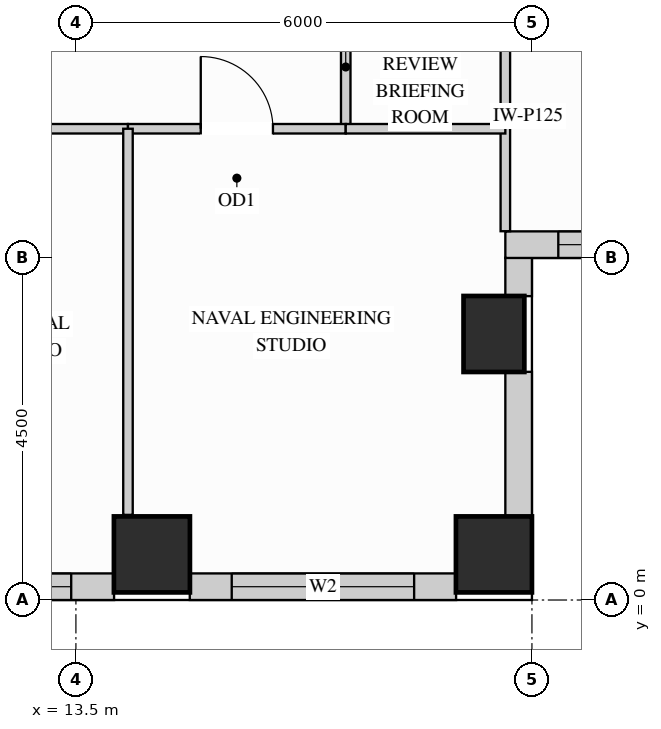
"""IFC4 building model, lengths in metres.
Left out: names, types, materials, properties, quantities, classifications, styles, units other than length and angle.
Written with IfcOpenShell. Run it as: python <this file> out.ifc"""

import sys

from ifc_helpers import new_model, si_unit, direction, frame, frame_2d, origin, origin_2d, place, context, subcontext, project, spatial, rectangle, extrude, source, transform, mapped, element, fill, save


model = new_model("IFC4")
c1 = context("Model", 3, precision=1e-05, world=origin(), true_north=direction((0.0, 1.0)))
c2 = subcontext(c1, "Body", "Model", "MODEL_VIEW")
j1 = project(units=[si_unit("LENGTHUNIT", "METRE"), si_unit("PLANEANGLEUNIT", "RADIAN")], contexts=[c1])
p1 = place(None, origin())
s1 = spatial("IfcSite", under=j1, at=p1, CompositionType="ELEMENT")
p2 = place(p1, origin())
s2 = spatial("IfcBuilding", under=s1, at=p2, CompositionType="ELEMENT")
p3 = place(p2, frame((0.0, 0.0, 150.3)))
s3 = spatial("IfcBuildingStorey", under=s2, at=p3, CompositionType="ELEMENT", Elevation=150.3)
m1 = source(origin(), c2, "Body", "SweptSolid", [
    extrude(rectangle(XDim=0.8, YDim=1.0, at=origin_2d()), origin(), (0.0, 0.0, 1.0), 3.4),
])
p4 = place(p3, frame((19.0, 3.5, 0.0), z_axis=(0.0, 0.0, 1.0), x_axis=(1.0, 0.0, 0.0)))
e1 = element("IfcColumn", 1, at=p4, inside=s3, PredefinedType="COLUMN", context=c2, shape_type="MappedRepresentation", body=[
    mapped(m1, transform((0.0, 0.0, 0.0), x_axis=(1.0, 0.0, 0.0), y_axis=(0.0, 1.0, 0.0), z_axis=(0.0, 0.0, 1.0))),
])
m2 = source(origin(), c2, "Body", "SweptSolid", [
    extrude(rectangle(XDim=1.0, YDim=1.0, at=origin_2d()), origin(), (0.0, 0.0, 1.0), 3.4),
])
for number, where, z_axis, x_axis in (
    (2, (14.5, 0.6, 0.0), (0.0, 0.0, 1.0), (1.0, 0.0, 0.0)),
    (3, (19.0, 0.6, 0.0), (0.0, 0.0, 1.0), (1.0, 0.0, 0.0)),
):
    element("IfcColumn", number, at=place(p3, frame(where, z_axis=z_axis, x_axis=x_axis)), inside=s3, PredefinedType="COLUMN", context=c2, shape_type="MappedRepresentation", body=[
        mapped(m2, transform((0.0, 0.0, 0.0), x_axis=(1.0, 0.0, 0.0), y_axis=(0.0, 1.0, 0.0), z_axis=(0.0, 0.0, 1.0))),
    ])
p5 = place(p3, frame((9.498, 0.175, 0.0), z_axis=(0.0, 0.0, 1.0), x_axis=(1.0, 0.0, 0.0)))
e4 = element("IfcWall", 4, at=p5, inside=s3, PredefinedType="SOLIDWALL", context=c2, shape_type="SweptSolid", body=[
    extrude(rectangle(XDim=4.504, YDim=0.35, at=frame_2d((2.252, 0.0))), origin(), (0.0, 0.0, 1.0), 2.612),
])
p6 = place(p5, frame((1.54, 0.0, 0.78)))
e5 = element("IfcOpeningElement", 5, at=p6, cuts=e4, PredefinedType="OPENING", context=c2, shape_type="SweptSolid", body=[
    extrude(rectangle(XDim=2.4, YDim=1.652, at=frame_2d((1.2, 0.826))), frame((0.0, 0.185, 0.0), z_axis=(0.0, -1.0, 0.0), x_axis=(1.0, 0.0, 0.0)), (0.0, 0.0, 1.0), 0.37),
])
p7 = place(p3, frame((14.998, 0.175, 0.0), z_axis=(0.0, 0.0, 1.0), x_axis=(1.0, 0.0, 0.0)))
e6 = element("IfcWall", 6, at=p7, inside=s3, PredefinedType="SOLIDWALL", context=c2, shape_type="SweptSolid", body=[
    extrude(rectangle(XDim=3.504, YDim=0.35, at=frame_2d((1.752, 0.0))), origin(), (0.0, 0.0, 1.0), 2.612),
])
p8 = place(p7, frame((0.552, 0.0, 0.78)))
e7 = element("IfcOpeningElement", 7, at=p8, cuts=e6, PredefinedType="OPENING", context=c2, shape_type="SweptSolid", body=[
    extrude(rectangle(XDim=2.4, YDim=1.652, at=frame_2d((1.2, 0.826))), frame((0.0, 0.185, 0.0), z_axis=(0.0, -1.0, 0.0), x_axis=(1.0, 0.0, 0.0)), (0.0, 0.0, 1.0), 0.37),
])
m3 = source(origin(), c2, "Body", "SweptSolid", [
    extrude(rectangle(XDim=1.904, YDim=0.35, at=frame_2d((0.952, 0.0))), origin(), (0.0, 0.0, 1.0), 2.612),
])
p9 = place(p3, frame((19.325, 1.098, 0.0), z_axis=(0.0, 0.0, 1.0), x_axis=(0.0, 1.0, 0.0)))
e8 = element("IfcWall", 8, at=p9, inside=s3, PredefinedType="SOLIDWALL", context=c2, shape_type="MappedRepresentation", body=[
    mapped(m3, transform((0.0, 0.0, 0.0), x_axis=(1.0, 0.0, 0.0), y_axis=(0.0, 1.0, 0.0), z_axis=(0.0, 0.0, 1.0))),
])
m4 = source(origin(), c2, "Body", "SweptSolid", [
    extrude(rectangle(XDim=0.504, YDim=0.35, at=frame_2d((0.252, 0.0))), origin(), (0.0, 0.0, 1.0), 2.773),
])
p10 = place(p3, frame((19.325, 3.998, 0.0), z_axis=(0.0, 0.0, 1.0), x_axis=(0.0, 1.0, 0.0)))
e9 = element("IfcWall", 9, at=p10, inside=s3, PredefinedType="SOLIDWALL", context=c2, shape_type="MappedRepresentation", body=[
    mapped(m4, transform((0.0, 0.0, 0.0), x_axis=(1.0, 0.0, 0.0), y_axis=(0.0, 1.0, 0.0), z_axis=(0.0, 0.0, 1.0))),
])
p11 = place(p3, frame((19.15, 4.675, 0.0), z_axis=(0.0, 0.0, 1.0), x_axis=(1.0, 0.0, 0.0)))
e10 = element("IfcWall", 10, at=p11, inside=s3, PredefinedType="SOLIDWALL", context=c2, shape_type="SweptSolid", body=[
    extrude(rectangle(XDim=15.6, YDim=0.35, at=frame_2d((7.8, 0.0))), origin(), (0.0, 0.0, 1.0), 3.385),
])
p12 = place(p11, frame((0.697, 0.0, 0.78)))
e11 = element("IfcOpeningElement", 11, at=p12, cuts=e10, PredefinedType="OPENING", context=c2, shape_type="SweptSolid", body=[
    extrude(rectangle(XDim=1.5, YDim=2.0, at=frame_2d((0.75, 1.0))), frame((0.0, 0.185, 0.0), z_axis=(0.0, -1.0, 0.0), x_axis=(1.0, 0.0, 0.0)), (0.0, 0.0, 1.0), 0.37),
])
p13 = place(p11, frame((2.573, 0.0, 0.78)))
e12 = element("IfcOpeningElement", 12, at=p13, cuts=e10, PredefinedType="OPENING", context=c2, shape_type="SweptSolid", body=[
    extrude(rectangle(XDim=1.5, YDim=2.0, at=frame_2d((0.75, 1.0))), frame((0.0, 0.185, 0.0), z_axis=(0.0, -1.0, 0.0), x_axis=(1.0, 0.0, 0.0)), (0.0, 0.0, 1.0), 0.37),
])
p14 = place(p11, frame((5.783, 0.0, 0.78)))
e13 = element("IfcOpeningElement", 13, at=p14, cuts=e10, PredefinedType="OPENING", context=c2, shape_type="SweptSolid", body=[
    extrude(rectangle(XDim=1.5, YDim=2.0, at=frame_2d((0.75, 1.0))), frame((0.0, 0.185, 0.0), z_axis=(0.0, -1.0, 0.0), x_axis=(1.0, 0.0, 0.0)), (0.0, 0.0, 1.0), 0.37),
])
p15 = place(p11, frame((8.117, 0.0, 0.78)))
e14 = element("IfcOpeningElement", 14, at=p15, cuts=e10, PredefinedType="OPENING", context=c2, shape_type="SweptSolid", body=[
    extrude(rectangle(XDim=1.5, YDim=2.0, at=frame_2d((0.75, 1.0))), frame((0.0, 0.185, 0.0), z_axis=(0.0, -1.0, 0.0), x_axis=(1.0, 0.0, 0.0)), (0.0, 0.0, 1.0), 0.37),
])
p16 = place(p11, frame((11.393, 0.0, 0.78)))
e15 = element("IfcOpeningElement", 15, at=p16, cuts=e10, PredefinedType="OPENING", context=c2, shape_type="SweptSolid", body=[
    extrude(rectangle(XDim=1.5, YDim=2.0, at=frame_2d((0.75, 1.0))), frame((0.0, 0.185, 0.0), z_axis=(0.0, -1.0, 0.0), x_axis=(1.0, 0.0, 0.0)), (0.0, 0.0, 1.0), 0.37),
])
p17 = place(p11, frame((13.337, 0.0, 0.78)))
e16 = element("IfcOpeningElement", 16, at=p17, cuts=e10, PredefinedType="OPENING", context=c2, shape_type="SweptSolid", body=[
    extrude(rectangle(XDim=1.5, YDim=2.0, at=frame_2d((0.75, 1.0))), frame((0.0, 0.185, 0.0), z_axis=(0.0, -1.0, 0.0), x_axis=(1.0, 0.0, 0.0)), (0.0, 0.0, 1.0), 0.37),
])
m5 = source(origin(), c2, "Body", "SweptSolid", [
    extrude(rectangle(XDim=3.128, YDim=0.125, at=frame_2d((1.564, 0.0))), origin(), (0.0, 0.0, 1.0), 2.773),
])
p18 = place(p3, frame((19.15, 4.852, 0.0), z_axis=(0.0, 0.0, 1.0), x_axis=(0.0, 1.0, 0.0)))
e17 = element("IfcWall", 17, at=p18, inside=s3, PredefinedType="PARTITIONING", context=c2, shape_type="MappedRepresentation", body=[
    mapped(m5, transform((0.0, 0.0, 0.0), x_axis=(1.0, 0.0, 0.0), y_axis=(0.0, 1.0, 0.0), z_axis=(0.0, 0.0, 1.0))),
])
p19 = place(p3, frame((17.05, 6.2, 0.0), z_axis=(0.0, 0.0, 1.0), x_axis=(0.0, 1.0, 0.0)))
e18 = element("IfcWall", 18, at=p19, inside=s3, PredefinedType="PARTITIONING", context=c2, shape_type="SweptSolid", body=[
    extrude(rectangle(XDim=4.4, YDim=0.125, at=frame_2d((2.2, 0.0))), origin(), (0.0, 0.0, 1.0), 3.385),
])
p20 = place(p19, frame((1.725, 0.0, 0.0)))
e19 = element("IfcOpeningElement", 19, at=p20, cuts=e18, PredefinedType="OPENING", context=c2, shape_type="SweptSolid", body=[
    extrude(rectangle(XDim=0.95, YDim=2.15, at=frame_2d((0.475, 1.075))), frame((0.0, 0.073, 0.0), z_axis=(0.0, -1.0, 0.0), x_axis=(1.0, 0.0, 0.0)), (0.0, 0.0, 1.0), 0.145),
])
p21 = place(p3, frame((10.544, 6.2, 0.0), z_axis=(0.0, 0.0, 1.0), x_axis=(1.0, 0.0, 0.0)))
e20 = element("IfcWall", 20, at=p21, inside=s3, PredefinedType="PARTITIONING", context=c2, shape_type="SweptSolid", body=[
    extrude(rectangle(XDim=3.641, YDim=0.125, at=frame_2d((1.821, 0.0))), origin(), (0.0, 0.0, 1.0), 2.848),
])
p22 = place(p21, frame((1.345, 0.0, 0.0)))
e21 = element("IfcOpeningElement", 21, at=p22, cuts=e20, PredefinedType="OPENING", context=c2, shape_type="SweptSolid", body=[
    extrude(rectangle(XDim=0.95, YDim=2.15, at=frame_2d((0.475, 1.075))), frame((0.0, 0.073, 0.0), z_axis=(0.0, -1.0, 0.0), x_axis=(1.0, 0.0, 0.0)), (0.0, 0.0, 1.0), 0.145),
])
p23 = place(p3, frame((14.185, 6.2, 0.0), z_axis=(0.0, 0.0, 1.0), x_axis=(1.0, 0.0, 0.0)))
e22 = element("IfcWall", 22, at=p23, inside=s3, PredefinedType="PARTITIONING", context=c2, shape_type="SweptSolid", body=[
    extrude(rectangle(XDim=2.865, YDim=0.125, at=frame_2d((1.433, 0.0))), origin(), (0.0, 0.0, 1.0), 2.848),
])
p24 = place(p23, frame((0.958, 0.0, 0.0)))
e23 = element("IfcOpeningElement", 23, at=p24, cuts=e22, PredefinedType="OPENING", context=c2, shape_type="SweptSolid", body=[
    extrude(rectangle(XDim=0.95, YDim=2.15, at=frame_2d((0.475, 1.075))), frame((0.0, 0.073, 0.0), z_axis=(0.0, -1.0, 0.0), x_axis=(1.0, 0.0, 0.0)), (0.0, 0.0, 1.0), 0.145),
])
m6 = source(origin(), c2, "Body", "SweptSolid", [
    extrude(rectangle(XDim=2.1, YDim=0.125, at=frame_2d((1.05, 0.0))), origin(), (0.0, 0.0, 1.0), 2.848),
])
p25 = place(p3, frame((17.05, 6.2, 0.0), z_axis=(0.0, 0.0, 1.0), x_axis=(1.0, 0.0, 0.0)))
e24 = element("IfcWall", 24, at=p25, inside=s3, PredefinedType="PARTITIONING", context=c2, shape_type="MappedRepresentation", body=[
    mapped(m6, transform((0.0, 0.0, 0.0), x_axis=(1.0, 0.0, 0.0), y_axis=(0.0, 1.0, 0.0), z_axis=(0.0, 0.0, 1.0))),
])
m7 = source(origin(), c2, "Body", "SweptSolid", [
    extrude(rectangle(XDim=5.08, YDim=0.125, at=frame_2d((2.54, 0.0))), origin(), (0.0, 0.0, 1.0), 3.385),
])
p26 = place(p3, frame((14.185, 1.12, 0.0), z_axis=(0.0, 0.0, 1.0), x_axis=(0.0, 1.0, 0.0)))
e25 = element("IfcWall", 25, at=p26, inside=s3, PredefinedType="PARTITIONING", context=c2, shape_type="MappedRepresentation", body=[
    mapped(m7, transform((0.0, 0.0, 0.0), x_axis=(1.0, 0.0, 0.0), y_axis=(0.0, 1.0, 0.0), z_axis=(0.0, 0.0, 1.0))),
])
m8 = source(origin(), c2, "Body", "SweptSolid", [
    extrude(rectangle(XDim=0.95, YDim=2.15, at=frame_2d((0.475, 1.075))), frame((0.0, 0.025, 0.0), z_axis=(0.0, -1.0, 0.0), x_axis=(1.0, 0.0, 0.0)), (0.0, 0.0, 1.0), 0.05),
])
p27 = place(p24, origin())
e26 = element("IfcDoor", 26, at=p27, inside=s3, OperationType="SINGLE_SWING_LEFT", PredefinedType="DOOR", context=c2, shape_type="MappedRepresentation", body=[
    mapped(m8, transform((0.0, 0.0, 0.0), x_axis=(1.0, 0.0, 0.0), y_axis=(0.0, 1.0, 0.0), z_axis=(0.0, 0.0, 1.0))),
])
fill(e23, e26)
m9 = source(origin(), c2, "Body", "SweptSolid", [
    extrude(rectangle(XDim=2.4, YDim=1.652, at=frame_2d((1.2, 0.826))), frame((0.0, 0.03, 0.0), z_axis=(0.0, -1.0, 0.0), x_axis=(1.0, 0.0, 0.0)), (0.0, 0.0, 1.0), 0.06),
])
p28 = place(p6, origin())
e27 = element("IfcWindow", 27, at=p28, inside=s3, PartitioningType="SINGLE_PANEL", PredefinedType="WINDOW", context=c2, shape_type="MappedRepresentation", body=[
    mapped(m9, transform((0.0, 0.0, 0.0), x_axis=(1.0, 0.0, 0.0), y_axis=(0.0, 1.0, 0.0), z_axis=(0.0, 0.0, 1.0))),
])
fill(e5, e27)
p29 = place(p8, origin())
e28 = element("IfcWindow", 28, at=p29, inside=s3, PartitioningType="SINGLE_PANEL", PredefinedType="WINDOW", context=c2, shape_type="MappedRepresentation", body=[
    mapped(m9, transform((0.0, 0.0, 0.0), x_axis=(1.0, 0.0, 0.0), y_axis=(0.0, 1.0, 0.0), z_axis=(0.0, 0.0, 1.0))),
])
fill(e7, e28)
m10 = source(origin(), c2, "Body", "SweptSolid", [
    extrude(rectangle(XDim=1.5, YDim=2.0, at=frame_2d((0.75, 1.0))), frame((0.0, 0.03, 0.0), z_axis=(0.0, -1.0, 0.0), x_axis=(1.0, 0.0, 0.0)), (0.0, 0.0, 1.0), 0.06),
])
p30 = place(p12, origin())
e29 = element("IfcWindow", 29, at=p30, inside=s3, PartitioningType="SINGLE_PANEL", PredefinedType="WINDOW", context=c2, shape_type="MappedRepresentation", body=[
    mapped(m10, transform((0.0, 0.0, 0.0), x_axis=(1.0, 0.0, 0.0), y_axis=(0.0, 1.0, 0.0), z_axis=(0.0, 0.0, 1.0))),
])
fill(e11, e29)
save(model, sys.argv[1])
